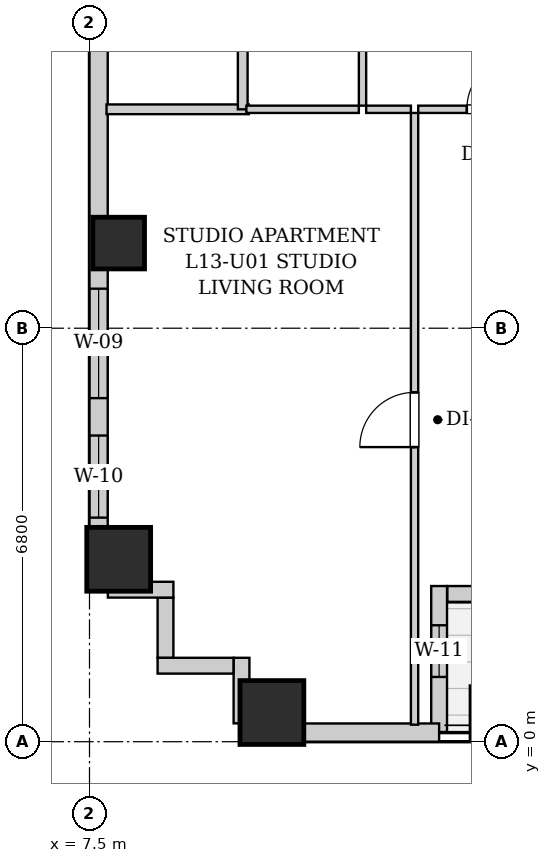
"""IFC4 building model, lengths in metres.
Left out: names, types, materials, properties, quantities, classifications, styles, units other than length and angle.
Written with IfcOpenShell. Run it as: python <this file> out.ifc"""

import sys

from ifc_helpers import new_model, si_unit, direction, frame, frame_2d, origin, origin_2d, place, context, subcontext, project, spatial, rectangle, extrude, element, fill, save


model = new_model("IFC4")
c1 = context("Model", 3, precision=1e-05, world=origin(), true_north=direction((0.0, 1.0)))
c2 = subcontext(c1, "Body", "Model", "MODEL_VIEW")
j1 = project(units=[si_unit("LENGTHUNIT", "METRE"), si_unit("PLANEANGLEUNIT", "RADIAN")], contexts=[c1])
p1 = place(None, origin())
s1 = spatial("IfcSite", under=j1, at=p1, CompositionType="ELEMENT")
p2 = place(p1, origin())
s2 = spatial("IfcBuilding", under=s1, at=p2, CompositionType="ELEMENT")
p3 = place(p2, frame((0.0, 0.0, 51.4)))
s3 = spatial("IfcBuildingStorey", under=s2, at=p3, CompositionType="ELEMENT", Elevation=51.4)
p4 = place(p3, frame((10.5, 0.48, 0.0), z_axis=(0.0, 0.0, 1.0), x_axis=(1.0, 0.0, 0.0)))
e1 = element("IfcColumn", 1, at=p4, inside=s3, PredefinedType="COLUMN", context=c2, shape_type="SweptSolid", body=[
    extrude(rectangle(XDim=1.05, YDim=1.05, at=origin_2d()), origin(), (0.0, 0.0, 1.0), 3.2),
])
p5 = place(p3, frame((14.2, 0.48, 0.0), z_axis=(0.0, 0.0, 1.0), x_axis=(1.0, 0.0, 0.0)))
e2 = element("IfcColumn", 2, at=p5, inside=s3, PredefinedType="COLUMN", context=c2, shape_type="SweptSolid", body=[
    extrude(rectangle(XDim=0.85, YDim=0.85, at=origin_2d()), origin(), (0.0, 0.0, 1.0), 3.2),
])
p6 = place(p3, frame((7.98, 3.0, 0.0), z_axis=(0.0, 0.0, 1.0), x_axis=(1.0, 0.0, 0.0)))
e3 = element("IfcColumn", 3, at=p6, inside=s3, PredefinedType="COLUMN", context=c2, shape_type="SweptSolid", body=[
    extrude(rectangle(XDim=1.05, YDim=1.05, at=origin_2d()), origin(), (0.0, 0.0, 1.0), 3.2),
])
p7 = place(p3, frame((7.98, 8.2, 0.0), z_axis=(0.0, 0.0, 1.0), x_axis=(1.0, 0.0, 0.0)))
e4 = element("IfcColumn", 4, at=p7, inside=s3, PredefinedType="COLUMN", context=c2, shape_type="SweptSolid", body=[
    extrude(rectangle(XDim=0.85, YDim=0.85, at=origin_2d()), origin(), (0.0, 0.0, 1.0), 3.2),
])
p8 = place(p3, frame((17.716, 2.43, 0.0), z_axis=(0.0, 0.0, 1.0), x_axis=(-1.0, 0.0, 0.0)))
e5 = element("IfcWall", 5, at=p8, inside=s3, PredefinedType="SOLIDWALL", context=c2, shape_type="SweptSolid", body=[
    extrude(rectangle(XDim=4.332, YDim=0.26, at=frame_2d((2.166, 0.0))), origin(), (0.0, 0.0, 1.0), 2.94),
])
p9 = place(p8, frame((0.95, 0.0, 0.0)))
e6 = element("IfcOpeningElement", 6, at=p9, cuts=e5, PredefinedType="OPENING", context=c2, shape_type="SweptSolid", body=[
    extrude(rectangle(XDim=1.1, YDim=2.0, at=frame_2d((0.55, 1.0))), frame((0.0, 0.14, 0.0), z_axis=(0.0, -1.0, 0.0), x_axis=(1.0, 0.0, 0.0)), (0.0, 0.0, 1.0), 0.28),
])
p10 = place(p3, frame((13.25, 2.56, 0.0), z_axis=(0.0, 0.0, 1.0), x_axis=(0.0, -1.0, 0.0)))
e7 = element("IfcWall", 7, at=p10, inside=s3, PredefinedType="SOLIDWALL", context=c2, shape_type="SweptSolid", body=[
    extrude(rectangle(XDim=2.4, YDim=0.26, at=frame_2d((1.2, 0.0))), origin(), (0.0, 0.0, 1.0), 2.94),
])
p11 = place(p10, frame((0.645, 0.0, 0.55)))
e8 = element("IfcOpeningElement", 8, at=p11, cuts=e7, PredefinedType="OPENING", context=c2, shape_type="SweptSolid", body=[
    extrude(rectangle(XDim=0.85, YDim=1.2, at=frame_2d((0.425, 0.6))), frame((0.0, 0.14, 0.0), z_axis=(0.0, -1.0, 0.0), x_axis=(1.0, 0.0, 0.0)), (0.0, 0.0, 1.0), 0.28),
])
p12 = place(p3, frame((13.25, 0.15, 0.0), z_axis=(0.0, 0.0, 1.0), x_axis=(-1.0, 0.0, 0.0)))
e9 = element("IfcWall", 9, at=p12, inside=s3, PredefinedType="SOLIDWALL", context=c2, shape_type="SweptSolid", body=[
    extrude(rectangle(XDim=3.25, YDim=0.3, at=frame_2d((1.625, 0.0))), origin(), (0.0, 0.0, 1.0), 1.975),
])
p13 = place(p3, frame((7.65, 2.5, 0.0), z_axis=(0.0, 0.0, 1.0), x_axis=(0.0, 1.0, 0.0)))
e10 = element("IfcWall", 10, at=p13, inside=s3, PredefinedType="SOLIDWALL", context=c2, shape_type="SweptSolid", body=[
    extrude(rectangle(XDim=42.6, YDim=0.3, at=frame_2d((21.3, 0.0))), origin(), (0.0, 0.0, 1.0), 1.975),
])
p14 = place(p13, frame((3.15, 0.0, 0.55)))
e11 = element("IfcOpeningElement", 11, at=p14, cuts=e10, PredefinedType="OPENING", context=c2, shape_type="SweptSolid", body=[
    extrude(rectangle(XDim=1.8, YDim=1.2, at=frame_2d((0.9, 0.6))), frame((0.0, 0.16, 0.0), z_axis=(0.0, -1.0, 0.0), x_axis=(1.0, 0.0, 0.0)), (0.0, 0.0, 1.0), 0.32),
])
p15 = place(p13, frame((1.185, 0.0, 0.55)))
e12 = element("IfcOpeningElement", 12, at=p15, cuts=e10, PredefinedType="OPENING", context=c2, shape_type="SweptSolid", body=[
    extrude(rectangle(XDim=1.35, YDim=1.2, at=frame_2d((0.675, 0.6))), frame((0.0, 0.16, 0.0), z_axis=(0.0, -1.0, 0.0), x_axis=(1.0, 0.0, 0.0)), (0.0, 0.0, 1.0), 0.32),
])
p16 = place(p13, frame((37.085, 0.0, 0.55)))
e13 = element("IfcOpeningElement", 13, at=p16, cuts=e10, PredefinedType="OPENING", context=c2, shape_type="SweptSolid", body=[
    extrude(rectangle(XDim=1.8, YDim=1.2, at=frame_2d((0.9, 0.6))), frame((0.0, 0.16, 0.0), z_axis=(0.0, -1.0, 0.0), x_axis=(1.0, 0.0, 0.0)), (0.0, 0.0, 1.0), 0.32),
])
p17 = place(p13, frame((31.55, 0.0, 0.55)))
e14 = element("IfcOpeningElement", 14, at=p17, cuts=e10, PredefinedType="OPENING", context=c2, shape_type="SweptSolid", body=[
    extrude(rectangle(XDim=1.35, YDim=1.2, at=frame_2d((0.675, 0.6))), frame((0.0, 0.16, 0.0), z_axis=(0.0, -1.0, 0.0), x_axis=(1.0, 0.0, 0.0)), (0.0, 0.0, 1.0), 0.32),
])
p18 = place(p13, frame((13.95, 0.0, 0.55)))
e15 = element("IfcOpeningElement", 15, at=p18, cuts=e10, PredefinedType="OPENING", context=c2, shape_type="SweptSolid", body=[
    extrude(rectangle(XDim=1.8, YDim=1.2, at=frame_2d((0.9, 0.6))), frame((0.0, 0.16, 0.0), z_axis=(0.0, -1.0, 0.0), x_axis=(1.0, 0.0, 0.0)), (0.0, 0.0, 1.0), 0.32),
])
p19 = place(p13, frame((23.325, 0.0, 0.55)))
e16 = element("IfcOpeningElement", 16, at=p19, cuts=e10, PredefinedType="OPENING", context=c2, shape_type="SweptSolid", body=[
    extrude(rectangle(XDim=1.8, YDim=1.2, at=frame_2d((0.9, 0.6))), frame((0.0, 0.16, 0.0), z_axis=(0.0, -1.0, 0.0), x_axis=(1.0, 0.0, 0.0)), (0.0, 0.0, 1.0), 0.32),
])
p20 = place(p3, frame((10.0, 0.302, 0.0), z_axis=(0.0, 0.0, 1.0), x_axis=(0.0, 1.0, 0.0)))
e17 = element("IfcWall", 17, at=p20, inside=s3, PredefinedType="SOLIDWALL", context=c2, shape_type="SweptSolid", body=[
    extrude(rectangle(XDim=1.078, YDim=0.26, at=frame_2d((0.539, 0.0))), origin(), (0.0, 0.0, 1.0), 2.94),
])
p21 = place(p3, frame((9.868, 1.25, 0.0), z_axis=(0.0, 0.0, 1.0), x_axis=(-1.0, 0.0, 0.0)))
e18 = element("IfcWall", 18, at=p21, inside=s3, PredefinedType="SOLIDWALL", context=c2, shape_type="SweptSolid", body=[
    extrude(rectangle(XDim=1.248, YDim=0.26, at=frame_2d((0.624, 0.0))), origin(), (0.0, 0.0, 1.0), 2.94),
])
p22 = place(p3, frame((8.75, 1.382, 0.0), z_axis=(0.0, 0.0, 1.0), x_axis=(0.0, 1.0, 0.0)))
e19 = element("IfcWall", 19, at=p22, inside=s3, PredefinedType="SOLIDWALL", context=c2, shape_type="SweptSolid", body=[
    extrude(rectangle(XDim=0.986, YDim=0.26, at=frame_2d((0.493, 0.0))), origin(), (0.0, 0.0, 1.0), 2.94),
])
p23 = place(p3, frame((8.88, 2.5, 0.0), z_axis=(0.0, 0.0, 1.0), x_axis=(-1.0, 0.0, 0.0)))
e20 = element("IfcWall", 20, at=p23, inside=s3, PredefinedType="SOLIDWALL", context=c2, shape_type="SweptSolid", body=[
    extrude(rectangle(XDim=1.078, YDim=0.26, at=frame_2d((0.539, 0.0))), origin(), (0.0, 0.0, 1.0), 2.94),
])
p24 = place(p3, frame((7.78, 10.4, 0.0), z_axis=(0.0, 0.0, 1.0), x_axis=(1.0, 0.0, 0.0)))
e21 = element("IfcWall", 21, at=p24, inside=s3, PredefinedType="PARTITIONING", context=c2, shape_type="SweptSolid", body=[
    extrude(rectangle(XDim=2.34, YDim=0.16, at=frame_2d((1.17, 0.0))), origin(), (0.0, 0.0, 1.0), 2.94),
])
p25 = place(p3, frame((10.02, 10.4, 0.0), z_axis=(0.0, 0.0, 1.0), x_axis=(0.0, 1.0, 0.0)))
e22 = element("IfcWall", 22, at=p25, inside=s3, PredefinedType="PARTITIONING", context=c2, shape_type="SweptSolid", body=[
    extrude(rectangle(XDim=2.91, YDim=0.16, at=frame_2d((1.455, 0.0))), origin(), (0.0, 0.0, 1.0), 2.94),
])
p26 = place(p3, frame((11.99, 10.46, 0.0), z_axis=(0.0, 0.0, 1.0), x_axis=(0.0, 1.0, 0.0)))
e23 = element("IfcWall", 23, at=p26, inside=s3, PredefinedType="PARTITIONING", context=c2, shape_type="SweptSolid", body=[
    extrude(rectangle(XDim=2.85, YDim=0.12, at=frame_2d((1.425, 0.0))), origin(), (0.0, 0.0, 1.0), 2.94),
])
p27 = place(p26, frame((0.995, 0.0, 0.0)))
e24 = element("IfcOpeningElement", 24, at=p27, cuts=e23, PredefinedType="OPENING", context=c2, shape_type="SweptSolid", body=[
    extrude(rectangle(XDim=0.86, YDim=2.05, at=frame_2d((0.43, 1.025))), frame((0.0, 0.07, 0.0), z_axis=(0.0, -1.0, 0.0), x_axis=(1.0, 0.0, 0.0)), (0.0, 0.0, 1.0), 0.14),
])
p28 = place(p3, frame((10.08, 10.4, 0.0), z_axis=(0.0, 0.0, 1.0), x_axis=(1.0, 0.0, 0.0)))
e25 = element("IfcWall", 25, at=p28, inside=s3, PredefinedType="PARTITIONING", context=c2, shape_type="SweptSolid", body=[
    extrude(rectangle(XDim=1.85, YDim=0.12, at=frame_2d((0.925, 0.0))), origin(), (0.0, 0.0, 1.0), 2.94),
])
p29 = place(p3, frame((12.05, 10.4, 0.0), z_axis=(0.0, 0.0, 1.0), x_axis=(1.0, 0.0, 0.0)))
e26 = element("IfcWall", 26, at=p29, inside=s3, PredefinedType="PARTITIONING", context=c2, shape_type="SweptSolid", body=[
    extrude(rectangle(XDim=0.736, YDim=0.12, at=frame_2d((0.368, 0.0))), origin(), (0.0, 0.0, 1.0), 2.94),
])
p30 = place(p3, frame((12.906, 10.4, 0.0), z_axis=(0.0, 0.0, 1.0), x_axis=(1.0, 0.0, 0.0)))
e27 = element("IfcWall", 27, at=p30, inside=s3, PredefinedType="PARTITIONING", context=c2, shape_type="SweptSolid", body=[
    extrude(rectangle(XDim=2.5, YDim=0.12, at=frame_2d((1.25, 0.0))), origin(), (0.0, 0.0, 1.0), 2.94),
])
p31 = place(p30, frame((0.8, 0.0, 0.0)))
e28 = element("IfcOpeningElement", 28, at=p31, cuts=e27, PredefinedType="OPENING", context=c2, shape_type="SweptSolid", body=[
    extrude(rectangle(XDim=0.9, YDim=2.05, at=frame_2d((0.45, 1.025))), frame((0.0, 0.07, 0.0), z_axis=(0.0, -1.0, 0.0), x_axis=(1.0, 0.0, 0.0)), (0.0, 0.0, 1.0), 0.14),
])
p32 = place(p3, frame((12.846, 0.28, 0.0), z_axis=(0.0, 0.0, 1.0), x_axis=(0.0, 1.0, 0.0)))
e29 = element("IfcWall", 29, at=p32, inside=s3, PredefinedType="PARTITIONING", context=c2, shape_type="SweptSolid", body=[
    extrude(rectangle(XDim=10.06, YDim=0.12, at=frame_2d((5.03, 0.0))), origin(), (0.0, 0.0, 1.0), 2.94),
])
p33 = place(p32, frame((4.565, 0.0, 0.0)))
e30 = element("IfcOpeningElement", 30, at=p33, cuts=e29, PredefinedType="OPENING", context=c2, shape_type="SweptSolid", body=[
    extrude(rectangle(XDim=0.9, YDim=2.05, at=frame_2d((0.45, 1.025))), frame((0.0, 0.07, 0.0), z_axis=(0.0, -1.0, 0.0), x_axis=(1.0, 0.0, 0.0)), (0.0, 0.0, 1.0), 0.14),
])
p34 = place(p31, origin())
e31 = element("IfcDoor", 31, at=p34, inside=s3, OperationType="SINGLE_SWING_RIGHT", PredefinedType="DOOR", context=c2, shape_type="SweptSolid", body=[
    extrude(rectangle(XDim=0.9, YDim=2.05, at=frame_2d((0.45, 1.025))), frame((0.0, 0.025, 0.0), z_axis=(0.0, -1.0, 0.0), x_axis=(1.0, 0.0, 0.0)), (0.0, 0.0, 1.0), 0.05),
])
fill(e28, e31)
p35 = place(p33, origin())
e32 = element("IfcDoor", 32, at=p35, inside=s3, OperationType="SINGLE_SWING_LEFT", PredefinedType="DOOR", context=c2, shape_type="SweptSolid", body=[
    extrude(rectangle(XDim=0.9, YDim=2.05, at=frame_2d((0.45, 1.025))), frame((0.0, 0.025, 0.0), z_axis=(0.0, -1.0, 0.0), x_axis=(1.0, 0.0, 0.0)), (0.0, 0.0, 1.0), 0.05),
])
fill(e30, e32)
p36 = place(p14, origin())
e33 = element("IfcWindow", 33, at=p36, inside=s3, PartitioningType="DOUBLE_PANEL_VERTICAL", PredefinedType="WINDOW", context=c2, shape_type="SweptSolid", body=[
    extrude(rectangle(XDim=1.8, YDim=1.2, at=frame_2d((0.9, 0.6))), frame((0.0, 0.03, 0.0), z_axis=(0.0, -1.0, 0.0), x_axis=(1.0, 0.0, 0.0)), (0.0, 0.0, 1.0), 0.06),
])
fill(e11, e33)
p37 = place(p15, origin())
e34 = element("IfcWindow", 34, at=p37, inside=s3, PartitioningType="SINGLE_PANEL", PredefinedType="WINDOW", context=c2, shape_type="SweptSolid", body=[
    extrude(rectangle(XDim=1.35, YDim=1.2, at=frame_2d((0.675, 0.6))), frame((0.0, 0.03, 0.0), z_axis=(0.0, -1.0, 0.0), x_axis=(1.0, 0.0, 0.0)), (0.0, 0.0, 1.0), 0.06),
])
fill(e12, e34)
p38 = place(p11, origin())
e35 = element("IfcWindow", 35, at=p38, inside=s3, PartitioningType="SINGLE_PANEL", PredefinedType="WINDOW", context=c2, shape_type="SweptSolid", body=[
    extrude(rectangle(XDim=0.85, YDim=1.2, at=frame_2d((0.425, 0.6))), frame((0.0, 0.03, 0.0), z_axis=(0.0, -1.0, 0.0), x_axis=(1.0, 0.0, 0.0)), (0.0, 0.0, 1.0), 0.06),
])
fill(e8, e35)
save(model, sys.argv[1])
